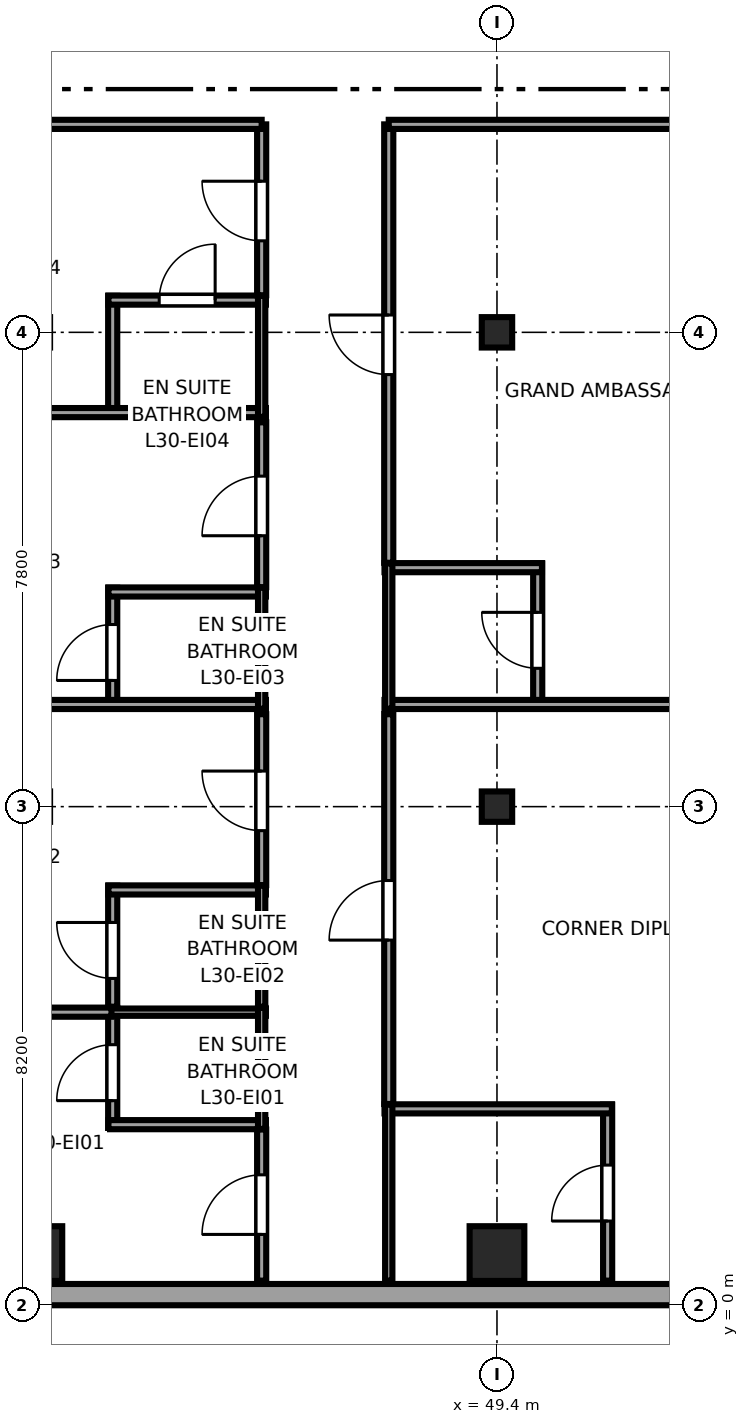
"""IFC4 building model, lengths in metres.
Left out: names, types, materials, properties, quantities, classifications, styles, units other than length and angle.
Written with IfcOpenShell. Run it as: python <this file> out.ifc"""

import sys

from ifc_helpers import new_model, si_unit, direction, frame, frame_2d, origin, origin_2d, place, context, subcontext, project, spatial, rectangle, i_section, extrude, source, transform, mapped, element, fill, save


model = new_model("IFC4")
c1 = context("Model", 3, precision=1e-05, world=origin(), true_north=direction((0.0, 1.0)))
c2 = subcontext(c1, "Body", "Model", "MODEL_VIEW")
j1 = project(units=[si_unit("LENGTHUNIT", "METRE"), si_unit("PLANEANGLEUNIT", "RADIAN")], contexts=[c1])
p1 = place(None, origin())
s1 = spatial("IfcSite", under=j1, at=p1, CompositionType="ELEMENT")
p2 = place(p1, origin())
s2 = spatial("IfcBuilding", under=s1, at=p2, CompositionType="ELEMENT")
p3 = place(p2, frame((0.0, 0.0, 118.65)))
s3 = spatial("IfcBuildingStorey", under=s2, at=p3, CompositionType="ELEMENT", Elevation=118.65)
m1 = source(origin(), c2, "Body", "SweptSolid", [
    extrude(rectangle(XDim=0.9, YDim=0.9, at=origin_2d()), origin(), (0.0, 0.0, 1.0), 3.55),
])
for number, where, z_axis, x_axis in (
    (1, (41.8, 0.85, 0.0), (0.0, 0.0, 1.0), (1.0, 0.0, 0.0)),
    (2, (49.4, 0.85, 0.0), (0.0, 0.0, 1.0), (1.0, 0.0, 0.0)),
):
    element("IfcColumn", number, at=place(p3, frame(where, z_axis=z_axis, x_axis=x_axis)), inside=s3, PredefinedType="COLUMN", context=c2, shape_type="MappedRepresentation", body=[
        mapped(m1, transform((0.0, 0.0, 0.0), x_axis=(1.0, 0.0, 0.0), y_axis=(0.0, 1.0, 0.0), z_axis=(0.0, 0.0, 1.0), scale=1.0)),
    ])
m2 = source(origin(), c2, "Body", "SweptSolid", [
    extrude(i_section(OverallWidth=0.5, OverallDepth=0.5, WebThickness=0.022, FlangeThickness=0.034, at=origin_2d()), origin(), (0.0, 0.0, 1.0), 3.55),
])
for number, where, z_axis, x_axis in (
    (3, (49.4, 8.2, 0.0), (0.0, 0.0, 1.0), (1.0, 0.0, 0.0)),
    (4, (49.4, 16.0, 0.0), (0.0, 0.0, 1.0), (1.0, 0.0, 0.0)),
):
    element("IfcColumn", number, at=place(p3, frame(where, z_axis=z_axis, x_axis=x_axis)), inside=s3, PredefinedType="COLUMN", context=c2, shape_type="MappedRepresentation", body=[
        mapped(m2, transform((0.0, 0.0, 0.0), x_axis=(1.0, 0.0, 0.0), y_axis=(0.0, 1.0, 0.0), z_axis=(0.0, 0.0, 1.0), scale=1.0)),
    ])
p4 = place(p3, frame((34.375, 0.175, 0.0), z_axis=(0.0, 0.0, 1.0), x_axis=(1.0, 0.0, 0.0)))
e5 = element("IfcWall", 5, at=p4, inside=s3, PredefinedType="SOLIDWALL", context=c2, shape_type="SweptSolid", body=[
    extrude(rectangle(XDim=18.008, YDim=0.35, at=frame_2d((9.004, 0.0))), origin(), (0.0, 0.0, 1.0), 3.37),
])
p5 = place(p4, frame((1.651, 0.0, 0.68)))
e6 = element("IfcOpeningElement", 6, at=p5, cuts=e5, PredefinedType="OPENING", context=c2, shape_type="SweptSolid", body=[
    extrude(rectangle(XDim=2.1, YDim=1.9, at=frame_2d((1.05, 0.95))), frame((0.0, 0.185, 0.0), z_axis=(0.0, -1.0, 0.0), x_axis=(1.0, 0.0, 0.0)), (0.0, 0.0, 1.0), 0.37),
])
p6 = place(p3, frame((43.08, 2.9, 0.0), z_axis=(0.0, 0.0, 1.0), x_axis=(0.0, 1.0, 0.0)))
e7 = element("IfcWall", 7, at=p6, inside=s3, PredefinedType="PARTITIONING", context=c2, shape_type="SweptSolid", body=[
    extrude(rectangle(XDim=1.99, YDim=0.15, at=frame_2d((0.995, 0.0))), origin(), (0.0, 0.0, 1.0), 3.37),
])
p7 = place(p6, frame((0.465, 0.0, 0.0)))
e8 = element("IfcOpeningElement", 8, at=p7, cuts=e7, PredefinedType="OPENING", context=c2, shape_type="SweptSolid", body=[
    extrude(rectangle(XDim=0.92, YDim=2.01, at=frame_2d((0.46, 1.005))), frame((0.0, 0.085, 0.0), z_axis=(0.0, -1.0, 0.0), x_axis=(1.0, 0.0, 0.0)), (0.0, 0.0, 1.0), 0.17),
])
p8 = place(p3, frame((43.01, 2.97, 0.0), z_axis=(0.0, 0.0, 1.0), x_axis=(1.0, 0.0, 0.0)))
e9 = element("IfcWall", 9, at=p8, inside=s3, PredefinedType="PARTITIONING", context=c2, shape_type="SweptSolid", body=[
    extrude(rectangle(XDim=2.59, YDim=0.15, at=frame_2d((1.295, 0.0))), origin(), (0.0, 0.0, 1.0), 3.37),
])
p9 = place(p3, frame((43.01, 4.82, 0.0), z_axis=(0.0, 0.0, 1.0), x_axis=(1.0, 0.0, 0.0)))
e10 = element("IfcWall", 10, at=p9, inside=s3, PredefinedType="PLUMBINGWALL", context=c2, shape_type="SweptSolid", body=[
    extrude(rectangle(XDim=2.59, YDim=0.12, at=frame_2d((1.295, 0.0))), origin(), (0.0, 0.0, 1.0), 3.37),
])
p10 = place(p3, frame((45.53, 2.9, 0.0), z_axis=(0.0, 0.0, 1.0), x_axis=(0.0, 1.0, 0.0)))
e11 = element("IfcWall", 11, at=p10, inside=s3, PredefinedType="PLUMBINGWALL", context=c2, shape_type="SweptSolid", body=[
    extrude(rectangle(XDim=1.99, YDim=0.12, at=frame_2d((0.995, 0.0))), origin(), (0.0, 0.0, 1.0), 3.37),
])
p11 = place(p3, frame((43.08, 4.91, 0.0), z_axis=(0.0, 0.0, 1.0), x_axis=(0.0, 1.0, 0.0)))
e12 = element("IfcWall", 12, at=p11, inside=s3, PredefinedType="PARTITIONING", context=c2, shape_type="SweptSolid", body=[
    extrude(rectangle(XDim=1.99, YDim=0.15, at=frame_2d((0.995, 0.0))), origin(), (0.0, 0.0, 1.0), 3.37),
])
p12 = place(p11, frame((0.465, 0.0, 0.0)))
e13 = element("IfcOpeningElement", 13, at=p12, cuts=e12, PredefinedType="OPENING", context=c2, shape_type="SweptSolid", body=[
    extrude(rectangle(XDim=0.92, YDim=2.01, at=frame_2d((0.46, 1.005))), frame((0.0, 0.085, 0.0), z_axis=(0.0, -1.0, 0.0), x_axis=(1.0, 0.0, 0.0)), (0.0, 0.0, 1.0), 0.17),
])
p13 = place(p3, frame((43.01, 6.83, 0.0), z_axis=(0.0, 0.0, 1.0), x_axis=(1.0, 0.0, 0.0)))
e14 = element("IfcWall", 14, at=p13, inside=s3, PredefinedType="PARTITIONING", context=c2, shape_type="SweptSolid", body=[
    extrude(rectangle(XDim=2.59, YDim=0.15, at=frame_2d((1.295, 0.0))), origin(), (0.0, 0.0, 1.0), 3.37),
])
p14 = place(p3, frame((45.53, 4.91, 0.0), z_axis=(0.0, 0.0, 1.0), x_axis=(0.0, 1.0, 0.0)))
e15 = element("IfcWall", 15, at=p14, inside=s3, PredefinedType="PLUMBINGWALL", context=c2, shape_type="SweptSolid", body=[
    extrude(rectangle(XDim=1.99, YDim=0.12, at=frame_2d((0.995, 0.0))), origin(), (0.0, 0.0, 1.0), 3.37),
])
p15 = place(p3, frame((43.08, 9.81, 0.0), z_axis=(0.0, 0.0, 1.0), x_axis=(0.0, 1.0, 0.0)))
e16 = element("IfcWall", 16, at=p15, inside=s3, PredefinedType="PARTITIONING", context=c2, shape_type="SweptSolid", body=[
    extrude(rectangle(XDim=1.99, YDim=0.15, at=frame_2d((0.995, 0.0))), origin(), (0.0, 0.0, 1.0), 3.37),
])
p16 = place(p15, frame((0.465, 0.0, 0.0)))
e17 = element("IfcOpeningElement", 17, at=p16, cuts=e16, PredefinedType="OPENING", context=c2, shape_type="SweptSolid", body=[
    extrude(rectangle(XDim=0.92, YDim=2.01, at=frame_2d((0.46, 1.005))), frame((0.0, 0.085, 0.0), z_axis=(0.0, -1.0, 0.0), x_axis=(1.0, 0.0, 0.0)), (0.0, 0.0, 1.0), 0.17),
])
p17 = place(p3, frame((34.65, 9.88, 0.0), z_axis=(0.0, 0.0, 1.0), x_axis=(1.0, 0.0, 0.0)))
e18 = element("IfcWall", 18, at=p17, inside=s3, PredefinedType="PARTITIONING", context=c2, shape_type="SweptSolid", body=[
    extrude(rectangle(XDim=10.95, YDim=0.15, at=frame_2d((5.475, 0.0))), origin(), (0.0, 0.0, 1.0), 3.37),
])
p18 = place(p3, frame((43.01, 11.73, 0.0), z_axis=(0.0, 0.0, 1.0), x_axis=(1.0, 0.0, 0.0)))
e19 = element("IfcWall", 19, at=p18, inside=s3, PredefinedType="PARTITIONING", context=c2, shape_type="SweptSolid", body=[
    extrude(rectangle(XDim=2.59, YDim=0.15, at=frame_2d((1.295, 0.0))), origin(), (0.0, 0.0, 1.0), 3.37),
])
p19 = place(p3, frame((45.53, 9.81, 0.0), z_axis=(0.0, 0.0, 1.0), x_axis=(0.0, 1.0, 0.0)))
e20 = element("IfcWall", 20, at=p19, inside=s3, PredefinedType="PLUMBINGWALL", context=c2, shape_type="SweptSolid", body=[
    extrude(rectangle(XDim=1.99, YDim=0.12, at=frame_2d((0.995, 0.0))), origin(), (0.0, 0.0, 1.0), 2.954),
])
p20 = place(p3, frame((43.08, 14.61, 0.0), z_axis=(0.0, 0.0, 1.0), x_axis=(0.0, 1.0, 0.0)))
e21 = element("IfcWall", 21, at=p20, inside=s3, PredefinedType="PARTITIONING", context=c2, shape_type="SweptSolid", body=[
    extrude(rectangle(XDim=1.99, YDim=0.15, at=frame_2d((0.995, 0.0))), origin(), (0.0, 0.0, 1.0), 3.37),
])
p21 = place(p3, frame((34.65, 14.68, 0.0), z_axis=(0.0, 0.0, 1.0), x_axis=(1.0, 0.0, 0.0)))
e22 = element("IfcWall", 22, at=p21, inside=s3, PredefinedType="PARTITIONING", context=c2, shape_type="SweptSolid", body=[
    extrude(rectangle(XDim=10.95, YDim=0.15, at=frame_2d((5.475, 0.0))), origin(), (0.0, 0.0, 1.0), 3.37),
])
p22 = place(p3, frame((43.01, 16.53, 0.0), z_axis=(0.0, 0.0, 1.0), x_axis=(1.0, 0.0, 0.0)))
e23 = element("IfcWall", 23, at=p22, inside=s3, PredefinedType="PARTITIONING", context=c2, shape_type="SweptSolid", body=[
    extrude(rectangle(XDim=2.59, YDim=0.15, at=frame_2d((1.295, 0.0))), origin(), (0.0, 0.0, 1.0), 3.37),
])
p23 = place(p22, frame((0.835, 0.0, 0.0)))
e24 = element("IfcOpeningElement", 24, at=p23, cuts=e23, PredefinedType="OPENING", context=c2, shape_type="SweptSolid", body=[
    extrude(rectangle(XDim=0.92, YDim=2.01, at=frame_2d((0.46, 1.005))), frame((0.0, 0.085, 0.0), z_axis=(0.0, -1.0, 0.0), x_axis=(1.0, 0.0, 0.0)), (0.0, 0.0, 1.0), 0.17),
])
p24 = place(p3, frame((45.53, 14.61, 0.0), z_axis=(0.0, 0.0, 1.0), x_axis=(0.0, 1.0, 0.0)))
e25 = element("IfcWall", 25, at=p24, inside=s3, PredefinedType="PLUMBINGWALL", context=c2, shape_type="SweptSolid", body=[
    extrude(rectangle(XDim=1.99, YDim=0.12, at=frame_2d((0.995, 0.0))), origin(), (0.0, 0.0, 1.0), 2.954),
])
p25 = place(p3, frame((51.22, 0.405, 0.0), z_axis=(0.0, 0.0, 1.0), x_axis=(0.0, 1.0, 0.0)))
e26 = element("IfcWall", 26, at=p25, inside=s3, PredefinedType="PARTITIONING", context=c2, shape_type="SweptSolid", body=[
    extrude(rectangle(XDim=2.895, YDim=0.15, at=frame_2d((1.448, 0.0))), origin(), (0.0, 0.0, 1.0), 3.37),
])
p26 = place(p25, frame((0.98, 0.0, 0.0)))
e27 = element("IfcOpeningElement", 27, at=p26, cuts=e26, PredefinedType="OPENING", context=c2, shape_type="SweptSolid", body=[
    extrude(rectangle(XDim=0.92, YDim=2.01, at=frame_2d((0.46, 1.005))), frame((0.0, 0.085, 0.0), z_axis=(0.0, -1.0, 0.0), x_axis=(1.0, 0.0, 0.0)), (0.0, 0.0, 1.0), 0.17),
])
p27 = place(p3, frame((47.55, 3.23, 0.0), z_axis=(0.0, 0.0, 1.0), x_axis=(1.0, 0.0, 0.0)))
e28 = element("IfcWall", 28, at=p27, inside=s3, PredefinedType="PARTITIONING", context=c2, shape_type="SweptSolid", body=[
    extrude(rectangle(XDim=3.74, YDim=0.15, at=frame_2d((1.87, 0.0))), origin(), (0.0, 0.0, 1.0), 3.37),
])
p28 = place(p3, frame((47.62, 0.405, 0.0), z_axis=(0.0, 0.0, 1.0), x_axis=(0.0, 1.0, 0.0)))
e29 = element("IfcWall", 29, at=p28, inside=s3, PredefinedType="PLUMBINGWALL", context=c2, shape_type="SweptSolid", body=[
    extrude(rectangle(XDim=2.895, YDim=0.12, at=frame_2d((1.448, 0.0))), origin(), (0.0, 0.0, 1.0), 3.37),
])
p29 = place(p3, frame((50.07, 9.81, 0.0), z_axis=(0.0, 0.0, 1.0), x_axis=(0.0, 1.0, 0.0)))
e30 = element("IfcWall", 30, at=p29, inside=s3, PredefinedType="PARTITIONING", context=c2, shape_type="SweptSolid", body=[
    extrude(rectangle(XDim=2.39, YDim=0.15, at=frame_2d((1.195, 0.0))), origin(), (0.0, 0.0, 1.0), 3.37),
])
p30 = place(p29, frame((0.665, 0.0, 0.0)))
e31 = element("IfcOpeningElement", 31, at=p30, cuts=e30, PredefinedType="OPENING", context=c2, shape_type="SweptSolid", body=[
    extrude(rectangle(XDim=0.92, YDim=2.01, at=frame_2d((0.46, 1.005))), frame((0.0, 0.085, 0.0), z_axis=(0.0, -1.0, 0.0), x_axis=(1.0, 0.0, 0.0)), (0.0, 0.0, 1.0), 0.17),
])
p31 = place(p3, frame((47.55, 9.88, 0.0), z_axis=(0.0, 0.0, 1.0), x_axis=(1.0, 0.0, 0.0)))
e32 = element("IfcWall", 32, at=p31, inside=s3, PredefinedType="PARTITIONING", context=c2, shape_type="SweptSolid", body=[
    extrude(rectangle(XDim=9.045, YDim=0.15, at=frame_2d((4.522, 0.0))), origin(), (0.0, 0.0, 1.0), 3.37),
])
p32 = place(p3, frame((47.55, 12.13, 0.0), z_axis=(0.0, 0.0, 1.0), x_axis=(1.0, 0.0, 0.0)))
e33 = element("IfcWall", 33, at=p32, inside=s3, PredefinedType="PARTITIONING", context=c2, shape_type="SweptSolid", body=[
    extrude(rectangle(XDim=2.59, YDim=0.15, at=frame_2d((1.295, 0.0))), origin(), (0.0, 0.0, 1.0), 3.37),
])
p33 = place(p3, frame((47.62, 9.81, 0.0), z_axis=(0.0, 0.0, 1.0), x_axis=(0.0, 1.0, 0.0)))
e34 = element("IfcWall", 34, at=p33, inside=s3, PredefinedType="PLUMBINGWALL", context=c2, shape_type="SweptSolid", body=[
    extrude(rectangle(XDim=2.39, YDim=0.12, at=frame_2d((1.195, 0.0))), origin(), (0.0, 0.0, 1.0), 3.37),
])
p34 = place(p3, frame((45.53, 0.405, 0.0), z_axis=(0.0, 0.0, 1.0), x_axis=(0.0, 1.0, 0.0)))
e35 = element("IfcWall", 35, at=p34, inside=s3, PredefinedType="PARTITIONING", context=c2, shape_type="SweptSolid", body=[
    extrude(rectangle(XDim=2.485, YDim=0.15, at=frame_2d((1.242, 0.0))), origin(), (0.0, 0.0, 1.0), 3.37),
])
p35 = place(p34, frame((0.76, 0.0, 0.0)))
e36 = element("IfcOpeningElement", 36, at=p35, cuts=e35, PredefinedType="OPENING", context=c2, shape_type="SweptSolid", body=[
    extrude(rectangle(XDim=0.98, YDim=2.12, at=frame_2d((0.49, 1.06))), frame((0.0, 0.085, 0.0), z_axis=(0.0, -1.0, 0.0), x_axis=(1.0, 0.0, 0.0)), (0.0, 0.0, 1.0), 0.17),
])
p36 = place(p3, frame((34.65, 4.82, 0.0), z_axis=(0.0, 0.0, 1.0), x_axis=(1.0, 0.0, 0.0)))
e37 = element("IfcWall", 37, at=p36, inside=s3, PredefinedType="PARTITIONING", context=c2, shape_type="SweptSolid", body=[
    extrude(rectangle(XDim=8.41, YDim=0.15, at=frame_2d((4.205, 0.0))), origin(), (0.0, 0.0, 1.0), 3.37),
])
p37 = place(p3, frame((45.53, 6.91, 0.0), z_axis=(0.0, 0.0, 1.0), x_axis=(0.0, 1.0, 0.0)))
e38 = element("IfcWall", 38, at=p37, inside=s3, PredefinedType="PARTITIONING", context=c2, shape_type="SweptSolid", body=[
    extrude(rectangle(XDim=2.81, YDim=0.15, at=frame_2d((1.405, 0.0))), origin(), (0.0, 0.0, 1.0), 2.954),
])
p38 = place(p37, frame((0.895, 0.0, 0.0)))
e39 = element("IfcOpeningElement", 39, at=p38, cuts=e38, PredefinedType="OPENING", context=c2, shape_type="SweptSolid", body=[
    extrude(rectangle(XDim=0.98, YDim=2.12, at=frame_2d((0.49, 1.06))), frame((0.0, 0.085, 0.0), z_axis=(0.0, -1.0, 0.0), x_axis=(1.0, 0.0, 0.0)), (0.0, 0.0, 1.0), 0.17),
])
p39 = place(p3, frame((45.53, 11.81, 0.0), z_axis=(0.0, 0.0, 1.0), x_axis=(0.0, 1.0, 0.0)))
e40 = element("IfcWall", 40, at=p39, inside=s3, PredefinedType="PARTITIONING", context=c2, shape_type="SweptSolid", body=[
    extrude(rectangle(XDim=2.71, YDim=0.15, at=frame_2d((1.355, 0.0))), origin(), (0.0, 0.0, 1.0), 2.954),
])
p40 = place(p39, frame((0.845, 0.0, 0.0)))
e41 = element("IfcOpeningElement", 41, at=p40, cuts=e40, PredefinedType="OPENING", context=c2, shape_type="SweptSolid", body=[
    extrude(rectangle(XDim=0.98, YDim=2.12, at=frame_2d((0.49, 1.06))), frame((0.0, 0.085, 0.0), z_axis=(0.0, -1.0, 0.0), x_axis=(1.0, 0.0, 0.0)), (0.0, 0.0, 1.0), 0.17),
])
p41 = place(p3, frame((45.53, 16.61, 0.0), z_axis=(0.0, 0.0, 1.0), x_axis=(0.0, 1.0, 0.0)))
e42 = element("IfcWall", 42, at=p41, inside=s3, PredefinedType="PARTITIONING", context=c2, shape_type="SweptSolid", body=[
    extrude(rectangle(XDim=2.81, YDim=0.15, at=frame_2d((1.405, 0.0))), origin(), (0.0, 0.0, 1.0), 2.954),
])
p42 = place(p41, frame((0.895, 0.0, 0.0)))
e43 = element("IfcOpeningElement", 43, at=p42, cuts=e42, PredefinedType="OPENING", context=c2, shape_type="SweptSolid", body=[
    extrude(rectangle(XDim=0.98, YDim=2.12, at=frame_2d((0.49, 1.06))), frame((0.0, 0.085, 0.0), z_axis=(0.0, -1.0, 0.0), x_axis=(1.0, 0.0, 0.0)), (0.0, 0.0, 1.0), 0.17),
])
p43 = place(p3, frame((34.65, 19.42, 0.0), z_axis=(0.0, 0.0, 1.0), x_axis=(1.0, 0.0, 0.0)))
e44 = element("IfcWall", 44, at=p43, inside=s3, PredefinedType="PARTITIONING", context=c2, shape_type="SweptSolid", body=[
    extrude(rectangle(XDim=10.88, YDim=0.15, at=frame_2d((5.44, 0.0))), origin(), (0.0, 0.0, 1.0), 3.37),
])
p44 = place(p3, frame((47.62, 3.31, 0.0), z_axis=(0.0, 0.0, 1.0), x_axis=(0.0, 1.0, 0.0)))
e45 = element("IfcWall", 45, at=p44, inside=s3, PredefinedType="PARTITIONING", context=c2, shape_type="SweptSolid", body=[
    extrude(rectangle(XDim=6.41, YDim=0.15, at=frame_2d((3.205, 0.0))), origin(), (0.0, 0.0, 1.0), 3.37),
])
p45 = place(p44, frame((2.695, 0.0, 0.0)))
e46 = element("IfcOpeningElement", 46, at=p45, cuts=e45, PredefinedType="OPENING", context=c2, shape_type="SweptSolid", body=[
    extrude(rectangle(XDim=0.98, YDim=2.12, at=frame_2d((0.49, 1.06))), frame((0.0, 0.085, 0.0), z_axis=(0.0, -1.0, 0.0), x_axis=(1.0, 0.0, 0.0)), (0.0, 0.0, 1.0), 0.17),
])
p46 = place(p3, frame((47.62, 12.21, 0.0), z_axis=(0.0, 0.0, 1.0), x_axis=(0.0, 1.0, 0.0)))
e47 = element("IfcWall", 47, at=p46, inside=s3, PredefinedType="PARTITIONING", context=c2, shape_type="SweptSolid", body=[
    extrude(rectangle(XDim=7.21, YDim=0.15, at=frame_2d((3.605, 0.0))), origin(), (0.0, 0.0, 1.0), 3.37),
])
p47 = place(p46, frame((3.095, 0.0, 0.0)))
e48 = element("IfcOpeningElement", 48, at=p47, cuts=e47, PredefinedType="OPENING", context=c2, shape_type="SweptSolid", body=[
    extrude(rectangle(XDim=0.98, YDim=2.12, at=frame_2d((0.49, 1.06))), frame((0.0, 0.085, 0.0), z_axis=(0.0, -1.0, 0.0), x_axis=(1.0, 0.0, 0.0)), (0.0, 0.0, 1.0), 0.17),
])
p48 = place(p3, frame((47.62, 19.42, 0.0), z_axis=(0.0, 0.0, 1.0), x_axis=(1.0, 0.0, 0.0)))
e49 = element("IfcWall", 49, at=p48, inside=s3, PredefinedType="PARTITIONING", context=c2, shape_type="SweptSolid", body=[
    extrude(rectangle(XDim=8.975, YDim=0.15, at=frame_2d((4.487, 0.0))), origin(), (0.0, 0.0, 1.0), 3.37),
])
m3 = source(origin(), c2, "Body", "SweptSolid", [
    extrude(rectangle(XDim=0.92, YDim=2.01, at=frame_2d((0.46, 1.005))), frame((0.0, 0.025, 0.0), z_axis=(0.0, -1.0, 0.0), x_axis=(1.0, 0.0, 0.0)), (0.0, 0.0, 1.0), 0.05),
])
p49 = place(p7, origin())
e50 = element("IfcDoor", 50, at=p49, inside=s3, OperationType="SINGLE_SWING_LEFT", PredefinedType="DOOR", context=c2, shape_type="MappedRepresentation", body=[
    mapped(m3, transform((0.0, 0.0, 0.0), x_axis=(1.0, 0.0, 0.0), y_axis=(0.0, 1.0, 0.0), z_axis=(0.0, 0.0, 1.0), scale=1.0)),
])
fill(e8, e50)
p50 = place(p12, origin())
e51 = element("IfcDoor", 51, at=p50, inside=s3, OperationType="SINGLE_SWING_RIGHT", PredefinedType="DOOR", context=c2, shape_type="MappedRepresentation", body=[
    mapped(m3, transform((0.0, 0.0, 0.0), x_axis=(1.0, 0.0, 0.0), y_axis=(0.0, 1.0, 0.0), z_axis=(0.0, 0.0, 1.0), scale=1.0)),
])
fill(e13, e51)
p51 = place(p16, origin())
e52 = element("IfcDoor", 52, at=p51, inside=s3, OperationType="SINGLE_SWING_LEFT", PredefinedType="DOOR", context=c2, shape_type="MappedRepresentation", body=[
    mapped(m3, transform((0.0, 0.0, 0.0), x_axis=(1.0, 0.0, 0.0), y_axis=(0.0, 1.0, 0.0), z_axis=(0.0, 0.0, 1.0), scale=1.0)),
])
fill(e17, e52)
p52 = place(p23, origin())
e53 = element("IfcDoor", 53, at=p52, inside=s3, OperationType="SINGLE_SWING_RIGHT", PredefinedType="DOOR", context=c2, shape_type="MappedRepresentation", body=[
    mapped(m3, transform((0.0, 0.0, 0.0), x_axis=(1.0, 0.0, 0.0), y_axis=(0.0, 1.0, 0.0), z_axis=(0.0, 0.0, 1.0), scale=1.0)),
])
fill(e24, e53)
p53 = place(p26, origin())
e54 = element("IfcDoor", 54, at=p53, inside=s3, OperationType="SINGLE_SWING_LEFT", PredefinedType="DOOR", context=c2, shape_type="MappedRepresentation", body=[
    mapped(m3, transform((0.0, 0.0, 0.0), x_axis=(1.0, 0.0, 0.0), y_axis=(0.0, 1.0, 0.0), z_axis=(0.0, 0.0, 1.0), scale=1.0)),
])
fill(e27, e54)
p54 = place(p30, origin())
e55 = element("IfcDoor", 55, at=p54, inside=s3, OperationType="SINGLE_SWING_RIGHT", PredefinedType="DOOR", context=c2, shape_type="MappedRepresentation", body=[
    mapped(m3, transform((0.0, 0.0, 0.0), x_axis=(1.0, 0.0, 0.0), y_axis=(0.0, 1.0, 0.0), z_axis=(0.0, 0.0, 1.0), scale=1.0)),
])
fill(e31, e55)
m4 = source(origin(), c2, "Body", "SweptSolid", [
    extrude(rectangle(XDim=0.98, YDim=2.12, at=frame_2d((0.49, 1.06))), frame((0.0, 0.025, 0.0), z_axis=(0.0, -1.0, 0.0), x_axis=(1.0, 0.0, 0.0)), (0.0, 0.0, 1.0), 0.05),
])
p55 = place(p35, origin())
e56 = element("IfcDoor", 56, at=p55, inside=s3, OperationType="SINGLE_SWING_LEFT", PredefinedType="DOOR", context=c2, shape_type="MappedRepresentation", body=[
    mapped(m4, transform((0.0, 0.0, 0.0), x_axis=(1.0, 0.0, 0.0), y_axis=(0.0, 1.0, 0.0), z_axis=(0.0, 0.0, 1.0), scale=1.0)),
])
fill(e36, e56)
p56 = place(p38, origin())
e57 = element("IfcDoor", 57, at=p56, inside=s3, OperationType="SINGLE_SWING_RIGHT", PredefinedType="DOOR", context=c2, shape_type="MappedRepresentation", body=[
    mapped(m4, transform((0.0, 0.0, 0.0), x_axis=(1.0, 0.0, 0.0), y_axis=(0.0, 1.0, 0.0), z_axis=(0.0, 0.0, 1.0), scale=1.0)),
])
fill(e39, e57)
p57 = place(p40, origin())
e58 = element("IfcDoor", 58, at=p57, inside=s3, OperationType="SINGLE_SWING_LEFT", PredefinedType="DOOR", context=c2, shape_type="MappedRepresentation", body=[
    mapped(m4, transform((0.0, 0.0, 0.0), x_axis=(1.0, 0.0, 0.0), y_axis=(0.0, 1.0, 0.0), z_axis=(0.0, 0.0, 1.0), scale=1.0)),
])
fill(e41, e58)
p58 = place(p42, origin())
e59 = element("IfcDoor", 59, at=p58, inside=s3, OperationType="SINGLE_SWING_RIGHT", PredefinedType="DOOR", context=c2, shape_type="MappedRepresentation", body=[
    mapped(m4, transform((0.0, 0.0, 0.0), x_axis=(1.0, 0.0, 0.0), y_axis=(0.0, 1.0, 0.0), z_axis=(0.0, 0.0, 1.0), scale=1.0)),
])
fill(e43, e59)
p59 = place(p45, origin())
e60 = element("IfcDoor", 60, at=p59, inside=s3, OperationType="SINGLE_SWING_LEFT", PredefinedType="DOOR", context=c2, shape_type="MappedRepresentation", body=[
    mapped(m4, transform((0.0, 0.0, 0.0), x_axis=(1.0, 0.0, 0.0), y_axis=(0.0, 1.0, 0.0), z_axis=(0.0, 0.0, 1.0), scale=1.0)),
])
fill(e46, e60)
p60 = place(p47, origin())
e61 = element("IfcDoor", 61, at=p60, inside=s3, OperationType="SINGLE_SWING_RIGHT", PredefinedType="DOOR", context=c2, shape_type="MappedRepresentation", body=[
    mapped(m4, transform((0.0, 0.0, 0.0), x_axis=(1.0, 0.0, 0.0), y_axis=(0.0, 1.0, 0.0), z_axis=(0.0, 0.0, 1.0), scale=1.0)),
])
fill(e48, e61)
save(model, sys.argv[1])
